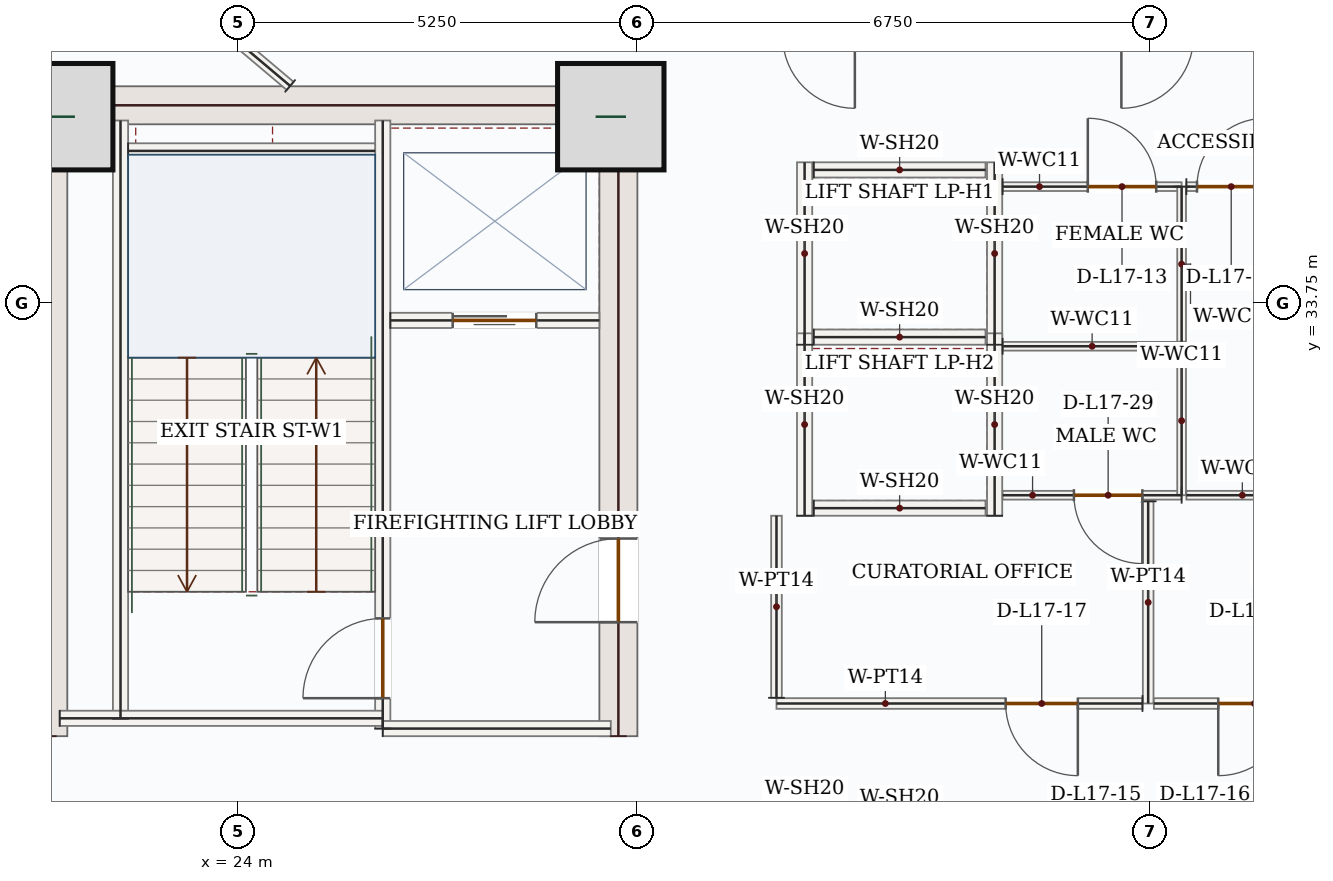
"""IFC4 building model, lengths in metres.
Left out: names, types, materials, properties, quantities, classifications, styles, units other than length and angle.
Written with IfcOpenShell. Run it as: python <this file> out.ifc"""

import sys

from ifc_helpers import new_model, si_unit, direction, frame, frame_2d, origin, origin_2d, place, context, subcontext, project, spatial, rectangle, extrude, source, transform, mapped, element, fill, save


model = new_model("IFC4")
c1 = context("Model", 3, precision=1e-05, world=origin(), true_north=direction((0.0, 1.0)))
c2 = subcontext(c1, "Body", "Model", "MODEL_VIEW")
j1 = project(units=[si_unit("LENGTHUNIT", "METRE"), si_unit("PLANEANGLEUNIT", "RADIAN")], contexts=[c1])
p1 = place(None, origin())
s1 = spatial("IfcSite", under=j1, at=p1, CompositionType="ELEMENT")
p2 = place(p1, origin())
s2 = spatial("IfcBuilding", under=s1, at=p2, CompositionType="ELEMENT")
p3 = place(p2, frame((0.0, 0.0, 79.5)))
s3 = spatial("IfcBuildingStorey", under=s2, at=p3, CompositionType="ELEMENT", Elevation=79.5)
m1 = source(origin(), c2, "Body", "SweptSolid", [
    extrude(rectangle(XDim=8.55, YDim=0.5, at=frame_2d((4.275, 0.0))), origin(), (0.0, 0.0, 1.0), 3.95),
])
p4 = place(p3, frame((21.5, 28.05, 0.0), z_axis=(0.0, 0.0, 1.0), x_axis=(0.0, 1.0, 0.0)))
e1 = element("IfcWall", 1, at=p4, inside=s3, PredefinedType="SHEAR", context=c2, shape_type="MappedRepresentation", body=[
    mapped(m1, transform((0.0, 0.0, 0.0), x_axis=(1.0, 0.0, 0.0), y_axis=(0.0, 1.0, 0.0), z_axis=(0.0, 0.0, 1.0), scale=1.0)),
])
p5 = place(p3, frame((29.0, 28.05, 0.0), z_axis=(0.0, 0.0, 1.0), x_axis=(0.0, 1.0, 0.0)))
e2 = element("IfcWall", 2, at=p5, inside=s3, PredefinedType="SHEAR", context=c2, shape_type="SweptSolid", body=[
    extrude(rectangle(XDim=8.55, YDim=0.5, at=frame_2d((4.275, 0.0))), origin(), (0.0, 0.0, 1.0), 3.95),
])
p6 = place(p5, frame((1.5, 0.0, 0.0)))
e3 = element("IfcOpeningElement", 3, at=p6, cuts=e2, PredefinedType="OPENING", context=c2, shape_type="SweptSolid", body=[
    extrude(rectangle(XDim=1.1, YDim=2.2, at=frame_2d((0.55, 1.1))), frame((0.0, 0.26, 0.0), z_axis=(0.0, -1.0, 0.0), x_axis=(1.0, 0.0, 0.0)), (0.0, 0.0, 1.0), 0.52),
])
m2 = source(origin(), c2, "Body", "SweptSolid", [
    extrude(rectangle(XDim=7.0, YDim=0.5, at=frame_2d((3.5, 0.0))), origin(), (0.0, 0.0, 1.0), 3.95),
])
p7 = place(p3, frame((21.75, 36.35, 0.0), z_axis=(0.0, 0.0, 1.0), x_axis=(1.0, 0.0, 0.0)))
e4 = element("IfcWall", 4, at=p7, inside=s3, PredefinedType="SHEAR", context=c2, shape_type="MappedRepresentation", body=[
    mapped(m2, transform((0.0, 0.0, 0.0), x_axis=(1.0, 0.0, 0.0), y_axis=(0.0, 1.0, 0.0), z_axis=(0.0, 0.0, 1.0), scale=1.0)),
])
m3 = source(origin(), c2, "Body", "SweptSolid", [
    extrude(rectangle(XDim=1.4, YDim=1.4, at=origin_2d()), origin(), (0.0, 0.0, 1.0), 4.2),
])
for number, where, z_axis, x_axis in (
    (5, (21.65, 36.2, 0.0), (0.0, 0.0, 1.0), (1.0, 0.0, 0.0)),
    (6, (28.9, 36.2, 0.0), (0.0, 0.0, 1.0), (1.0, 0.0, 0.0)),
):
    element("IfcColumn", number, at=place(p3, frame(where, z_axis=z_axis, x_axis=x_axis)), inside=s3, PredefinedType="COLUMN", context=c2, shape_type="MappedRepresentation", body=[
        mapped(m3, transform((0.0, 0.0, 0.0), x_axis=(1.0, 0.0, 0.0), y_axis=(0.0, 1.0, 0.0), z_axis=(0.0, 0.0, 1.0), scale=1.0)),
    ])
m4 = source(origin(), c2, "Body", "SweptSolid", [
    extrude(rectangle(XDim=5.258, YDim=0.32, at=frame_2d((2.629, 0.0))), origin(), (0.0, 0.0, 1.0), 3.95),
])
p8 = place(p3, frame((18.94, 35.542, 0.0), z_axis=(0.0, 0.0, 1.0), x_axis=(0.707106781187, 0.707106781187, 0.0)))
e7 = element("IfcWall", 7, at=p8, inside=s3, PredefinedType="SOLIDWALL", context=c2, shape_type="MappedRepresentation", body=[
    mapped(m4, transform((0.0, 0.0, 0.0), x_axis=(1.0, 0.0, 0.0), y_axis=(0.0, 1.0, 0.0), z_axis=(0.0, 0.0, 1.0), scale=1.0)),
])
m5 = source(origin(), c2, "Body", "SweptSolid", [
    extrude(rectangle(XDim=7.87, YDim=0.2, at=frame_2d((3.935, 0.0))), origin(), (0.0, 0.0, 1.0), 3.95),
])
p9 = place(p3, frame((22.45, 28.28, 0.0), z_axis=(0.0, 0.0, 1.0), x_axis=(0.0, 1.0, 0.0)))
e8 = element("IfcWall", 8, at=p9, inside=s3, PredefinedType="SOLIDWALL", context=c2, shape_type="MappedRepresentation", body=[
    mapped(m5, transform((0.0, 0.0, 0.0), x_axis=(1.0, 0.0, 0.0), y_axis=(0.0, 1.0, 0.0), z_axis=(0.0, 0.0, 1.0), scale=1.0)),
])
p10 = place(p3, frame((25.9, 28.15, 0.0), z_axis=(0.0, 0.0, 1.0), x_axis=(0.0, 1.0, 0.0)))
e9 = element("IfcWall", 9, at=p10, inside=s3, PredefinedType="SOLIDWALL", context=c2, shape_type="SweptSolid", body=[
    extrude(rectangle(XDim=8.0, YDim=0.2, at=frame_2d((4.0, 0.0))), origin(), (0.0, 0.0, 1.0), 3.95),
])
p11 = place(p10, frame((0.4, 0.0, 0.0)))
e10 = element("IfcOpeningElement", 10, at=p11, cuts=e9, PredefinedType="OPENING", context=c2, shape_type="SweptSolid", body=[
    extrude(rectangle(XDim=1.05, YDim=2.15, at=frame_2d((0.525, 1.075))), frame((0.0, 0.11, 0.0), z_axis=(0.0, -1.0, 0.0), x_axis=(1.0, 0.0, 0.0)), (0.0, 0.0, 1.0), 0.22),
])
m6 = source(origin(), c2, "Body", "SweptSolid", [
    extrude(rectangle(XDim=4.25, YDim=0.2, at=frame_2d((2.125, 0.0))), origin(), (0.0, 0.0, 1.0), 3.95),
])
p12 = place(p3, frame((21.65, 28.285, 0.0), z_axis=(0.0, 0.0, 1.0), x_axis=(1.0, 0.0, 0.0)))
e11 = element("IfcWall", 11, at=p12, inside=s3, PredefinedType="SOLIDWALL", context=c2, shape_type="MappedRepresentation", body=[
    mapped(m6, transform((0.0, 0.0, 0.0), x_axis=(1.0, 0.0, 0.0), y_axis=(0.0, 1.0, 0.0), z_axis=(0.0, 0.0, 1.0), scale=1.0)),
])
m7 = source(origin(), c2, "Body", "SweptSolid", [
    extrude(rectangle(XDim=3.0, YDim=0.2, at=frame_2d((1.5, 0.0))), origin(), (0.0, 0.0, 1.0), 3.95),
])
p13 = place(p3, frame((25.9, 28.15, 0.0), z_axis=(0.0, 0.0, 1.0), x_axis=(1.0, 0.0, 0.0)))
e12 = element("IfcWall", 12, at=p13, inside=s3, PredefinedType="SOLIDWALL", context=c2, shape_type="MappedRepresentation", body=[
    mapped(m7, transform((0.0, 0.0, 0.0), x_axis=(1.0, 0.0, 0.0), y_axis=(0.0, 1.0, 0.0), z_axis=(0.0, 0.0, 1.0), scale=1.0)),
])
m8 = source(origin(), c2, "Body", "SweptSolid", [
    extrude(rectangle(XDim=3.25, YDim=0.2, at=frame_2d((1.625, 0.0))), origin(), (0.0, 0.0, 1.0), 3.95),
])
p14 = place(p3, frame((22.55, 35.75, 0.0), z_axis=(0.0, 0.0, 1.0), x_axis=(1.0, 0.0, 0.0)))
e13 = element("IfcWall", 13, at=p14, inside=s3, PredefinedType="SOLIDWALL", context=c2, shape_type="MappedRepresentation", body=[
    mapped(m8, transform((0.0, 0.0, 0.0), x_axis=(1.0, 0.0, 0.0), y_axis=(0.0, 1.0, 0.0), z_axis=(0.0, 0.0, 1.0), scale=1.0)),
])
p15 = place(p3, frame((26.0, 33.52, 0.0), z_axis=(0.0, 0.0, 1.0), x_axis=(1.0, 0.0, 0.0)))
e14 = element("IfcWall", 14, at=p15, inside=s3, PredefinedType="SOLIDWALL", context=c2, shape_type="SweptSolid", body=[
    extrude(rectangle(XDim=2.75, YDim=0.2, at=frame_2d((1.375, 0.0))), origin(), (0.0, 0.0, 1.0), 3.95),
])
p16 = place(p15, frame((0.82, 0.0, 0.0)))
e15 = element("IfcOpeningElement", 15, at=p16, cuts=e14, PredefinedType="OPENING", context=c2, shape_type="SweptSolid", body=[
    extrude(rectangle(XDim=1.1, YDim=2.15, at=frame_2d((0.55, 1.075))), frame((0.0, 0.11, 0.0), z_axis=(0.0, -1.0, 0.0), x_axis=(1.0, 0.0, 0.0)), (0.0, 0.0, 1.0), 0.22),
])
m9 = source(origin(), c2, "Body", "SweptSolid", [
    extrude(rectangle(XDim=2.4, YDim=0.2, at=frame_2d((1.2, 0.0))), origin(), (0.0, 0.0, 1.0), 3.95),
])
for number, where, z_axis, x_axis in (
    (16, (31.45, 33.2, 0.0), (0.0, 0.0, 1.0), (0.0, 1.0, 0.0)),
    (17, (33.95, 33.2, 0.0), (0.0, 0.0, 1.0), (0.0, 1.0, 0.0)),
):
    element("IfcWall", number, at=place(p3, frame(where, z_axis=z_axis, x_axis=x_axis)), inside=s3, PredefinedType="SOLIDWALL", context=c2, shape_type="MappedRepresentation", body=[
        mapped(m9, transform((0.0, 0.0, 0.0), x_axis=(1.0, 0.0, 0.0), y_axis=(0.0, 1.0, 0.0), z_axis=(0.0, 0.0, 1.0), scale=1.0)),
    ])
m10 = source(origin(), c2, "Body", "SweptSolid", [
    extrude(rectangle(XDim=2.26, YDim=0.2, at=frame_2d((1.13, 0.0))), origin(), (0.0, 0.0, 1.0), 3.95),
])
for number, where, z_axis, x_axis in (
    (18, (31.57, 33.3, 0.0), (0.0, 0.0, 1.0), (1.0, 0.0, 0.0)),
    (19, (31.57, 35.5, 0.0), (0.0, 0.0, 1.0), (1.0, 0.0, 0.0)),
):
    element("IfcWall", number, at=place(p3, frame(where, z_axis=z_axis, x_axis=x_axis)), inside=s3, PredefinedType="SOLIDWALL", context=c2, shape_type="MappedRepresentation", body=[
        mapped(m10, transform((0.0, 0.0, 0.0), x_axis=(1.0, 0.0, 0.0), y_axis=(0.0, 1.0, 0.0), z_axis=(0.0, 0.0, 1.0), scale=1.0)),
    ])
for number, where, z_axis, x_axis in (
    (20, (31.45, 30.95, 0.0), (0.0, 0.0, 1.0), (0.0, 1.0, 0.0)),
    (21, (33.95, 30.95, 0.0), (0.0, 0.0, 1.0), (0.0, 1.0, 0.0)),
):
    element("IfcWall", number, at=place(p3, frame(where, z_axis=z_axis, x_axis=x_axis)), inside=s3, PredefinedType="SOLIDWALL", context=c2, shape_type="MappedRepresentation", body=[
        mapped(m9, transform((0.0, 0.0, 0.0), x_axis=(1.0, 0.0, 0.0), y_axis=(0.0, 1.0, 0.0), z_axis=(0.0, 0.0, 1.0), scale=1.0)),
    ])
p17 = place(p3, frame((31.57, 31.05, 0.0), z_axis=(0.0, 0.0, 1.0), x_axis=(1.0, 0.0, 0.0)))
e22 = element("IfcWall", 22, at=p17, inside=s3, PredefinedType="SOLIDWALL", context=c2, shape_type="MappedRepresentation", body=[
    mapped(m10, transform((0.0, 0.0, 0.0), x_axis=(1.0, 0.0, 0.0), y_axis=(0.0, 1.0, 0.0), z_axis=(0.0, 0.0, 1.0), scale=1.0)),
])
p18 = place(p3, frame((36.41, 31.22, 0.0), z_axis=(0.0, 0.0, 1.0), x_axis=(-1.0, 0.0, 0.0)))
e23 = element("IfcWall", 23, at=p18, inside=s3, PredefinedType="PARTITIONING", context=c2, shape_type="SweptSolid", body=[
    extrude(rectangle(XDim=2.355, YDim=0.115, at=frame_2d((1.177, 0.0))), origin(), (0.0, 0.0, 1.0), 3.95),
])
p19 = place(p18, frame((0.517, 0.0, 0.0)))
e24 = element("IfcOpeningElement", 24, at=p19, cuts=e23, PredefinedType="OPENING", context=c2, shape_type="SweptSolid", body=[
    extrude(rectangle(XDim=0.9, YDim=2.1, at=frame_2d((0.45, 1.05))), frame((0.0, 0.067, 0.0), z_axis=(0.0, -1.0, 0.0), x_axis=(1.0, 0.0, 0.0)), (0.0, 0.0, 1.0), 0.135),
])
m11 = source(origin(), c2, "Body", "SweptSolid", [
    extrude(rectangle(XDim=2.355, YDim=0.115, at=frame_2d((1.177, 0.0))), origin(), (0.0, 0.0, 1.0), 3.95),
])
p20 = place(p3, frame((34.055, 33.18, 0.0), z_axis=(0.0, 0.0, 1.0), x_axis=(1.0, 0.0, 0.0)))
e25 = element("IfcWall", 25, at=p20, inside=s3, PredefinedType="PARTITIONING", context=c2, shape_type="MappedRepresentation", body=[
    mapped(m11, transform((0.0, 0.0, 0.0), x_axis=(1.0, 0.0, 0.0), y_axis=(0.0, 1.0, 0.0), z_axis=(0.0, 0.0, 1.0), scale=1.0)),
])
m12 = source(origin(), c2, "Body", "SweptSolid", [
    extrude(rectangle(XDim=1.96, YDim=0.115, at=frame_2d((0.98, 0.0))), origin(), (0.0, 0.0, 1.0), 3.95),
])
p21 = place(p3, frame((36.41, 33.18, 0.0), z_axis=(0.0, 0.0, 1.0), x_axis=(0.0, -1.0, 0.0)))
e26 = element("IfcWall", 26, at=p21, inside=s3, PredefinedType="PARTITIONING", context=c2, shape_type="MappedRepresentation", body=[
    mapped(m12, transform((0.0, 0.0, 0.0), x_axis=(1.0, 0.0, 0.0), y_axis=(0.0, 1.0, 0.0), z_axis=(0.0, 0.0, 1.0), scale=1.0)),
])
p22 = place(p3, frame((34.055, 35.28, 0.0), z_axis=(0.0, 0.0, 1.0), x_axis=(1.0, 0.0, 0.0)))
e27 = element("IfcWall", 27, at=p22, inside=s3, PredefinedType="PARTITIONING", context=c2, shape_type="SweptSolid", body=[
    extrude(rectangle(XDim=2.355, YDim=0.115, at=frame_2d((1.177, 0.0))), origin(), (0.0, 0.0, 1.0), 3.95),
])
p23 = place(p22, frame((1.121, 0.0, 0.0)))
e28 = element("IfcOpeningElement", 28, at=p23, cuts=e27, PredefinedType="OPENING", context=c2, shape_type="SweptSolid", body=[
    extrude(rectangle(XDim=0.9, YDim=2.1, at=frame_2d((0.45, 1.05))), frame((0.0, 0.067, 0.0), z_axis=(0.0, -1.0, 0.0), x_axis=(1.0, 0.0, 0.0)), (0.0, 0.0, 1.0), 0.135),
])
m13 = source(origin(), c2, "Body", "SweptSolid", [
    extrude(rectangle(XDim=2.04, YDim=0.115, at=frame_2d((1.02, 0.0))), origin(), (0.0, 0.0, 1.0), 3.95),
])
p24 = place(p3, frame((36.41, 35.28, 0.0), z_axis=(0.0, 0.0, 1.0), x_axis=(0.0, -1.0, 0.0)))
e29 = element("IfcWall", 29, at=p24, inside=s3, PredefinedType="PARTITIONING", context=c2, shape_type="MappedRepresentation", body=[
    mapped(m13, transform((0.0, 0.0, 0.0), x_axis=(1.0, 0.0, 0.0), y_axis=(0.0, 1.0, 0.0), z_axis=(0.0, 0.0, 1.0), scale=1.0)),
])
m14 = source(origin(), c2, "Body", "SweptSolid", [
    extrude(rectangle(XDim=1.473, YDim=0.115, at=frame_2d((0.736, 0.0))), origin(), (0.0, 0.0, 1.0), 3.95),
])
p25 = place(p3, frame((37.945, 31.22, 0.0), z_axis=(0.0, 0.0, 1.0), x_axis=(-1.0, 0.0, 0.0)))
e30 = element("IfcWall", 30, at=p25, inside=s3, PredefinedType="PARTITIONING", context=c2, shape_type="MappedRepresentation", body=[
    mapped(m14, transform((0.0, 0.0, 0.0), x_axis=(1.0, 0.0, 0.0), y_axis=(0.0, 1.0, 0.0), z_axis=(0.0, 0.0, 1.0), scale=1.0)),
])
p26 = place(p3, frame((36.472, 35.28, 0.0), z_axis=(0.0, 0.0, 1.0), x_axis=(1.0, 0.0, 0.0)))
e31 = element("IfcWall", 31, at=p26, inside=s3, PredefinedType="PARTITIONING", context=c2, shape_type="SweptSolid", body=[
    extrude(rectangle(XDim=1.473, YDim=0.115, at=frame_2d((0.736, 0.0))), origin(), (0.0, 0.0, 1.0), 3.95),
])
p27 = place(p26, frame((0.14, 0.0, 0.0)))
e32 = element("IfcOpeningElement", 32, at=p27, cuts=e31, PredefinedType="OPENING", context=c2, shape_type="SweptSolid", body=[
    extrude(rectangle(XDim=0.9, YDim=2.1, at=frame_2d((0.45, 1.05))), frame((0.0, 0.067, 0.0), z_axis=(0.0, -1.0, 0.0), x_axis=(1.0, 0.0, 0.0)), (0.0, 0.0, 1.0), 0.135),
])
m15 = source(origin(), c2, "Body", "SweptSolid", [
    extrude(rectangle(XDim=2.66, YDim=0.14, at=frame_2d((1.33, 0.0))), origin(), (0.0, 0.0, 1.0), 3.95),
])
p28 = place(p3, frame((35.97, 31.14, 0.0), z_axis=(0.0, 0.0, 1.0), x_axis=(0.0, -1.0, 0.0)))
e33 = element("IfcWall", 33, at=p28, inside=s3, PredefinedType="PARTITIONING", context=c2, shape_type="MappedRepresentation", body=[
    mapped(m15, transform((0.0, 0.0, 0.0), x_axis=(1.0, 0.0, 0.0), y_axis=(0.0, 1.0, 0.0), z_axis=(0.0, 0.0, 1.0), scale=1.0)),
])
p29 = place(p3, frame((35.895, 28.48, 0.0), z_axis=(0.0, 0.0, 1.0), x_axis=(-1.0, 0.0, 0.0)))
e34 = element("IfcWall", 34, at=p29, inside=s3, PredefinedType="PARTITIONING", context=c2, shape_type="SweptSolid", body=[
    extrude(rectangle(XDim=4.815, YDim=0.14, at=frame_2d((2.407, 0.0))), origin(), (0.0, 0.0, 1.0), 3.95),
])
p30 = place(p29, frame((0.85, 0.0, 0.0)))
e35 = element("IfcOpeningElement", 35, at=p30, cuts=e34, PredefinedType="OPENING", context=c2, shape_type="SweptSolid", body=[
    extrude(rectangle(XDim=0.95, YDim=2.15, at=frame_2d((0.475, 1.075))), frame((0.0, 0.08, 0.0), z_axis=(0.0, -1.0, 0.0), x_axis=(1.0, 0.0, 0.0)), (0.0, 0.0, 1.0), 0.16),
])
m16 = source(origin(), c2, "Body", "SweptSolid", [
    extrude(rectangle(XDim=2.395, YDim=0.14, at=frame_2d((1.198, 0.0))), origin(), (0.0, 0.0, 1.0), 3.95),
])
p31 = place(p3, frame((31.08, 28.555, 0.0), z_axis=(0.0, 0.0, 1.0), x_axis=(0.0, 1.0, 0.0)))
e36 = element("IfcWall", 36, at=p31, inside=s3, PredefinedType="PARTITIONING", context=c2, shape_type="MappedRepresentation", body=[
    mapped(m16, transform((0.0, 0.0, 0.0), x_axis=(1.0, 0.0, 0.0), y_axis=(0.0, 1.0, 0.0), z_axis=(0.0, 0.0, 1.0), scale=1.0)),
])
p32 = place(p3, frame((40.845, 28.48, 0.0), z_axis=(0.0, 0.0, 1.0), x_axis=(-1.0, 0.0, 0.0)))
e37 = element("IfcWall", 37, at=p32, inside=s3, PredefinedType="PARTITIONING", context=c2, shape_type="SweptSolid", body=[
    extrude(rectangle(XDim=4.8, YDim=0.14, at=frame_2d((2.4, 0.0))), origin(), (0.0, 0.0, 1.0), 3.95),
])
p33 = place(p32, frame((3.003, 0.0, 0.0)))
e38 = element("IfcOpeningElement", 38, at=p33, cuts=e37, PredefinedType="OPENING", context=c2, shape_type="SweptSolid", body=[
    extrude(rectangle(XDim=0.95, YDim=2.15, at=frame_2d((0.475, 1.075))), frame((0.0, 0.08, 0.0), z_axis=(0.0, -1.0, 0.0), x_axis=(1.0, 0.0, 0.0)), (0.0, 0.0, 1.0), 0.16),
])
m17 = source(origin(), c2, "Body", "SweptSolid", [
    extrude(rectangle(XDim=3.155, YDim=0.14, at=frame_2d((1.577, 0.0))), origin(), (0.0, 0.0, 1.0), 3.95),
])
p34 = place(p3, frame((24.682, 36.605, 0.0), z_axis=(0.0, 0.0, 1.0), x_axis=(-0.76411384058, 0.645081420159, 0.0)))
e39 = element("IfcWall", 39, at=p34, inside=s3, PredefinedType="PARTITIONING", context=c2, shape_type="MappedRepresentation", body=[
    mapped(m17, transform((0.0, 0.0, 0.0), x_axis=(1.0, 0.0, 0.0), y_axis=(0.0, 1.0, 0.0), z_axis=(0.0, 0.0, 1.0), scale=1.0)),
])
m18 = source(origin(), c2, "Body", "SweptSolid", [
    extrude(rectangle(XDim=1.05, YDim=2.15, at=frame_2d((0.525, 1.075))), frame((0.0, 0.025, 0.0), z_axis=(0.0, -1.0, 0.0), x_axis=(1.0, 0.0, 0.0)), (0.0, 0.0, 1.0), 0.05),
])
p35 = place(p11, origin())
e40 = element("IfcDoor", 40, at=p35, inside=s3, OperationType="SINGLE_SWING_LEFT", PredefinedType="DOOR", context=c2, shape_type="MappedRepresentation", body=[
    mapped(m18, transform((0.0, 0.0, 0.0), x_axis=(1.0, 0.0, 0.0), y_axis=(0.0, 1.0, 0.0), z_axis=(0.0, 0.0, 1.0), scale=1.0)),
])
fill(e10, e40)
m19 = source(origin(), c2, "Body", "SweptSolid", [
    extrude(rectangle(XDim=1.1, YDim=2.15, at=frame_2d((0.55, 1.075))), frame((0.0, 0.025, 0.0), z_axis=(0.0, -1.0, 0.0), x_axis=(1.0, 0.0, 0.0)), (0.0, 0.0, 1.0), 0.05),
])
p36 = place(p16, origin())
e41 = element("IfcDoor", 41, at=p36, inside=s3, OperationType="DOUBLE_DOOR_SLIDING", PredefinedType="DOOR", context=c2, shape_type="MappedRepresentation", body=[
    mapped(m19, transform((0.0, 0.0, 0.0), x_axis=(1.0, 0.0, 0.0), y_axis=(0.0, 1.0, 0.0), z_axis=(0.0, 0.0, 1.0), scale=1.0)),
])
fill(e15, e41)
m20 = source(origin(), c2, "Body", "SweptSolid", [
    extrude(rectangle(XDim=1.1, YDim=2.2, at=frame_2d((0.55, 1.1))), frame((0.0, 0.025, 0.0), z_axis=(0.0, -1.0, 0.0), x_axis=(1.0, 0.0, 0.0)), (0.0, 0.0, 1.0), 0.05),
])
p37 = place(p6, origin())
e42 = element("IfcDoor", 42, at=p37, inside=s3, OperationType="SINGLE_SWING_LEFT", PredefinedType="DOOR", context=c2, shape_type="MappedRepresentation", body=[
    mapped(m20, transform((0.0, 0.0, 0.0), x_axis=(1.0, 0.0, 0.0), y_axis=(0.0, 1.0, 0.0), z_axis=(0.0, 0.0, 1.0), scale=1.0)),
])
fill(e3, e42)
m21 = source(origin(), c2, "Body", "SweptSolid", [
    extrude(rectangle(XDim=0.9, YDim=2.1, at=frame_2d((0.45, 1.05))), frame((0.0, 0.025, 0.0), z_axis=(0.0, -1.0, 0.0), x_axis=(1.0, 0.0, 0.0)), (0.0, 0.0, 1.0), 0.05),
])
p38 = place(p23, origin())
e43 = element("IfcDoor", 43, at=p38, inside=s3, OperationType="SINGLE_SWING_LEFT", PredefinedType="DOOR", context=c2, shape_type="MappedRepresentation", body=[
    mapped(m21, transform((0.0, 0.0, 0.0), x_axis=(1.0, 0.0, 0.0), y_axis=(0.0, 1.0, 0.0), z_axis=(0.0, 0.0, 1.0), scale=1.0)),
])
fill(e28, e43)
p39 = place(p27, origin())
e44 = element("IfcDoor", 44, at=p39, inside=s3, OperationType="SINGLE_SWING_RIGHT", PredefinedType="DOOR", context=c2, shape_type="MappedRepresentation", body=[
    mapped(m21, transform((0.0, 0.0, 0.0), x_axis=(1.0, 0.0, 0.0), y_axis=(0.0, 1.0, 0.0), z_axis=(0.0, 0.0, 1.0), scale=1.0)),
])
fill(e32, e44)
m22 = source(origin(), c2, "Body", "SweptSolid", [
    extrude(rectangle(XDim=0.95, YDim=2.15, at=frame_2d((0.475, 1.075))), frame((0.0, 0.025, 0.0), z_axis=(0.0, -1.0, 0.0), x_axis=(1.0, 0.0, 0.0)), (0.0, 0.0, 1.0), 0.05),
])
p40 = place(p30, origin())
e45 = element("IfcDoor", 45, at=p40, inside=s3, OperationType="SINGLE_SWING_LEFT", PredefinedType="DOOR", context=c2, shape_type="MappedRepresentation", body=[
    mapped(m22, transform((0.0, 0.0, 0.0), x_axis=(1.0, 0.0, 0.0), y_axis=(0.0, 1.0, 0.0), z_axis=(0.0, 0.0, 1.0), scale=1.0)),
])
fill(e35, e45)
p41 = place(p33, origin())
e46 = element("IfcDoor", 46, at=p41, inside=s3, OperationType="SINGLE_SWING_RIGHT", PredefinedType="DOOR", context=c2, shape_type="MappedRepresentation", body=[
    mapped(m22, transform((0.0, 0.0, 0.0), x_axis=(1.0, 0.0, 0.0), y_axis=(0.0, 1.0, 0.0), z_axis=(0.0, 0.0, 1.0), scale=1.0)),
])
fill(e38, e46)
p42 = place(p19, origin())
e47 = element("IfcDoor", 47, at=p42, inside=s3, OperationType="SINGLE_SWING_LEFT", PredefinedType="DOOR", context=c2, shape_type="MappedRepresentation", body=[
    mapped(m21, transform((0.0, 0.0, 0.0), x_axis=(1.0, 0.0, 0.0), y_axis=(0.0, 1.0, 0.0), z_axis=(0.0, 0.0, 1.0), scale=1.0)),
])
fill(e24, e47)
save(model, sys.argv[1])
